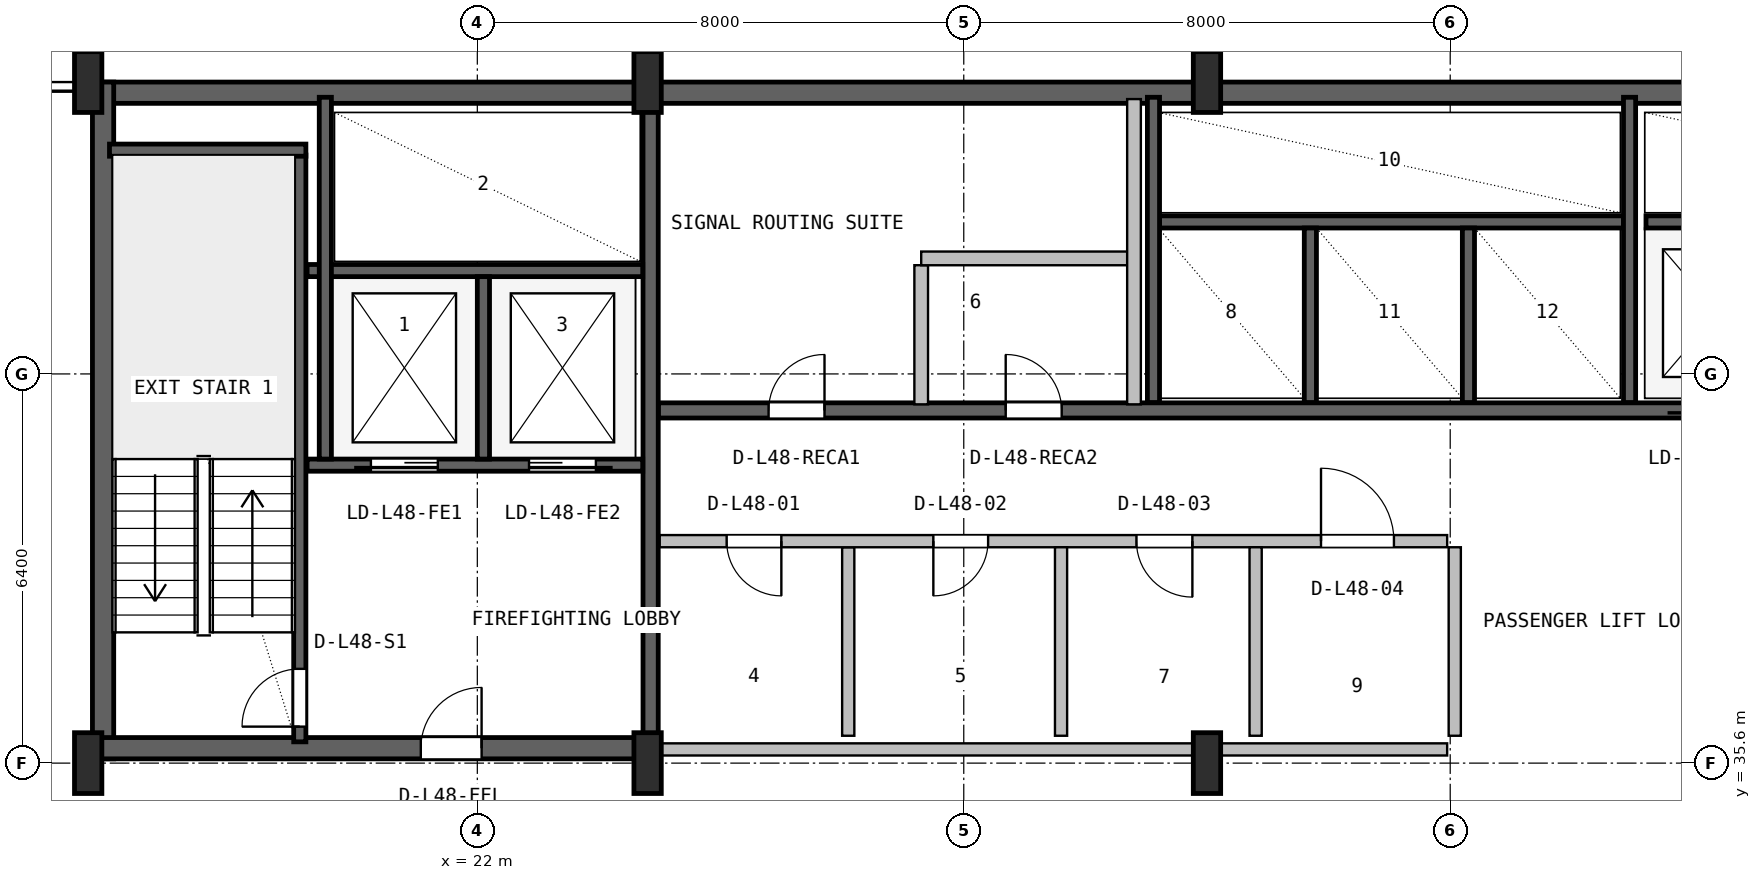
"""IFC4 building model, lengths in metres.
Left out: names, types, materials, properties, quantities, classifications, styles, units other than length and angle.
Written with IfcOpenShell. Run it as: python <this file> out.ifc"""

import sys

from ifc_helpers import new_model, si_unit, direction, frame, frame_2d, origin, origin_2d, place, context, subcontext, project, spatial, rectangle, i_section, extrude, source, transform, mapped, element, fill, save


model = new_model("IFC4")
c1 = context("Model", 3, precision=1e-05, world=origin(), true_north=direction((0.0, 1.0)))
c2 = subcontext(c1, "Body", "Model", "MODEL_VIEW")
j1 = project(units=[si_unit("LENGTHUNIT", "METRE"), si_unit("PLANEANGLEUNIT", "RADIAN")], contexts=[c1])
p1 = place(None, origin())
s1 = spatial("IfcSite", under=j1, at=p1, CompositionType="ELEMENT")
p2 = place(p1, origin())
s2 = spatial("IfcBuilding", under=s1, at=p2, CompositionType="ELEMENT")
p3 = place(p2, frame((0.0, 0.0, 196.0)))
s3 = spatial("IfcBuildingStorey", under=s2, at=p3, CompositionType="ELEMENT", Elevation=196.0)
p4 = place(p3, frame((15.6, 46.625, 0.0), z_axis=(0.0, 0.0, 1.0), x_axis=(1.0, 0.0, 0.0)))
e1 = element("IfcWall", 1, at=p4, inside=s3, PredefinedType="SHEAR", context=c2, shape_type="SweptSolid", body=[
    extrude(rectangle(XDim=36.8, YDim=0.35, at=frame_2d((18.4, 0.0))), origin(), (0.0, 0.0, 1.0), 3.55),
])
p5 = place(p3, frame((15.845, 35.67, 0.0), z_axis=(0.0, 0.0, 1.0), x_axis=(0.0, 1.0, 0.0)))
e2 = element("IfcWall", 2, at=p5, inside=s3, PredefinedType="SHEAR", context=c2, shape_type="SweptSolid", body=[
    extrude(rectangle(XDim=11.13, YDim=0.35, at=frame_2d((5.565, 0.0))), origin(), (0.0, 0.0, 1.0), 3.55),
])
p6 = place(p3, frame((15.67, 35.845, 0.0), z_axis=(0.0, 0.0, 1.0), x_axis=(1.0, 0.0, 0.0)))
e3 = element("IfcWall", 3, at=p6, inside=s3, PredefinedType="SHEAR", context=c2, shape_type="SweptSolid", body=[
    extrude(rectangle(XDim=9.13, YDim=0.35, at=frame_2d((4.565, 0.0))), origin(), (0.0, 0.0, 1.0), 3.55),
])
p7 = place(p6, frame((5.4, 0.0, 0.0)))
e4 = element("IfcOpeningElement", 4, at=p7, cuts=e3, PredefinedType="OPENING", context=c2, shape_type="SweptSolid", body=[
    extrude(rectangle(XDim=1.0, YDim=2.1, at=frame_2d((0.5, 1.05))), frame((0.0, 0.185, 0.0), z_axis=(0.0, -1.0, 0.0), x_axis=(1.0, 0.0, 0.0)), (0.0, 0.0, 1.0), 0.37),
])
m1 = source(origin(), c2, "Body", "SweptSolid", [
    extrude(i_section(OverallWidth=0.45, OverallDepth=1.0, WebThickness=0.016, FlangeThickness=0.03, FilletRadius=0.016, at=origin_2d()), origin(), (0.0, 0.0, 1.0), 3.8),
])
for number, where, z_axis, x_axis in (
    (5, (15.6, 35.6, 0.0), (0.0, 0.0, 1.0), (1.0, 0.0, 0.0)),
    (6, (15.6, 46.8, 0.0), (0.0, 0.0, 1.0), (1.0, 0.0, 0.0)),
    (7, (24.8, 35.6, 0.0), (0.0, 0.0, 1.0), (1.0, 0.0, 0.0)),
    (8, (24.8, 46.8, 0.0), (0.0, 0.0, 1.0), (1.0, 0.0, 0.0)),
    (9, (34.0, 35.6, 0.0), (0.0, 0.0, 1.0), (1.0, 0.0, 0.0)),
    (10, (34.0, 46.8, 0.0), (0.0, 0.0, 1.0), (1.0, 0.0, 0.0)),
):
    element("IfcColumn", number, at=place(p3, frame(where, z_axis=z_axis, x_axis=x_axis)), inside=s3, PredefinedType="COLUMN", context=c2, shape_type="MappedRepresentation", body=[
        mapped(m1, transform((0.0, 0.0, 0.0), x_axis=(1.0, 0.0, 0.0), y_axis=(0.0, 1.0, 0.0), z_axis=(0.0, 0.0, 1.0), scale=1.0)),
    ])
p8 = place(p3, frame((19.08, 35.95, 0.0), z_axis=(0.0, 0.0, 1.0), x_axis=(0.0, 1.0, 0.0)))
e11 = element("IfcWall", 11, at=p8, inside=s3, PredefinedType="SHEAR", context=c2, shape_type="SweptSolid", body=[
    extrude(rectangle(XDim=9.65, YDim=0.2, at=frame_2d((4.825, 0.0))), origin(), (0.0, 0.0, 1.0), 3.55),
])
p9 = place(p8, frame((0.25, 0.0, 0.0)))
e12 = element("IfcOpeningElement", 12, at=p9, cuts=e11, PredefinedType="OPENING", context=c2, shape_type="SweptSolid", body=[
    extrude(rectangle(XDim=0.95, YDim=2.1, at=frame_2d((0.475, 1.05))), frame((0.0, 0.11, 0.0), z_axis=(0.0, -1.0, 0.0), x_axis=(1.0, 0.0, 0.0)), (0.0, 0.0, 1.0), 0.22),
])
p10 = place(p3, frame((15.95, 45.68, 0.0), z_axis=(0.0, 0.0, 1.0), x_axis=(1.0, 0.0, 0.0)))
e13 = element("IfcWall", 13, at=p10, inside=s3, PredefinedType="SHEAR", context=c2, shape_type="SweptSolid", body=[
    extrude(rectangle(XDim=3.23, YDim=0.2, at=frame_2d((1.615, 0.0))), origin(), (0.0, 0.0, 1.0), 3.55),
])
p11 = place(p3, frame((24.85, 36.05, 0.0), z_axis=(0.0, 0.0, 1.0), x_axis=(0.0, 1.0, 0.0)))
e14 = element("IfcWall", 14, at=p11, inside=s3, PredefinedType="SHEAR", context=c2, shape_type="SweptSolid", body=[
    extrude(rectangle(XDim=10.45, YDim=0.25, at=frame_2d((5.225, 0.0))), origin(), (0.0, 0.0, 1.0), 3.55),
])
p12 = place(p3, frame((19.2, 40.5, 0.0), z_axis=(0.0, 0.0, 1.0), x_axis=(1.0, 0.0, 0.0)))
e15 = element("IfcWall", 15, at=p12, inside=s3, PredefinedType="SHEAR", context=c2, shape_type="SweptSolid", body=[
    extrude(rectangle(XDim=5.52, YDim=0.2, at=frame_2d((2.76, 0.0))), origin(), (0.0, 0.0, 1.0), 3.55),
])
p13 = place(p12, frame((1.05, 0.0, 0.0)))
e16 = element("IfcOpeningElement", 16, at=p13, cuts=e15, PredefinedType="OPENING", context=c2, shape_type="SweptSolid", body=[
    extrude(rectangle(XDim=1.1, YDim=2.18, at=frame_2d((0.55, 1.09))), frame((0.0, 0.11, 0.0), z_axis=(0.0, -1.0, 0.0), x_axis=(1.0, 0.0, 0.0)), (0.0, 0.0, 1.0), 0.22),
])
p14 = place(p12, frame((3.65, 0.0, 0.0)))
e17 = element("IfcOpeningElement", 17, at=p14, cuts=e15, PredefinedType="OPENING", context=c2, shape_type="SweptSolid", body=[
    extrude(rectangle(XDim=1.1, YDim=2.18, at=frame_2d((0.55, 1.09))), frame((0.0, 0.11, 0.0), z_axis=(0.0, -1.0, 0.0), x_axis=(1.0, 0.0, 0.0)), (0.0, 0.0, 1.0), 0.22),
])
p15 = place(p3, frame((19.2, 43.7, 0.0), z_axis=(0.0, 0.0, 1.0), x_axis=(1.0, 0.0, 0.0)))
e18 = element("IfcWall", 18, at=p15, inside=s3, PredefinedType="SHEAR", context=c2, shape_type="SweptSolid", body=[
    extrude(rectangle(XDim=5.52, YDim=0.2, at=frame_2d((2.76, 0.0))), origin(), (0.0, 0.0, 1.0), 3.55),
])
p16 = place(p3, frame((22.1, 40.6, 0.0), z_axis=(0.0, 0.0, 1.0), x_axis=(0.0, 1.0, 0.0)))
e19 = element("IfcWall", 19, at=p16, inside=s3, PredefinedType="SHEAR", context=c2, shape_type="SweptSolid", body=[
    extrude(rectangle(XDim=3.0, YDim=0.2, at=frame_2d((1.5, 0.0))), origin(), (0.0, 0.0, 1.0), 3.55),
])
p17 = place(p3, frame((19.5, 40.6, 0.0), z_axis=(0.0, 0.0, 1.0), x_axis=(0.0, 1.0, 0.0)))
e20 = element("IfcWall", 20, at=p17, inside=s3, PredefinedType="SHEAR", context=c2, shape_type="SweptSolid", body=[
    extrude(rectangle(XDim=5.95, YDim=0.2, at=frame_2d((2.975, 0.0))), origin(), (0.0, 0.0, 1.0), 3.55),
])
p18 = place(p3, frame((24.98, 41.4, 0.0), z_axis=(0.0, 0.0, 1.0), x_axis=(1.0, 0.0, 0.0)))
e21 = element("IfcWall", 21, at=p18, inside=s3, PredefinedType="SHEAR", context=c2, shape_type="SweptSolid", body=[
    extrude(rectangle(XDim=23.82, YDim=0.25, at=frame_2d((11.91, 0.0))), origin(), (0.0, 0.0, 1.0), 3.55),
])
p19 = place(p18, frame((16.87, 0.0, 0.0)))
e22 = element("IfcOpeningElement", 22, at=p19, cuts=e21, PredefinedType="OPENING", context=c2, shape_type="SweptSolid", body=[
    extrude(rectangle(XDim=1.1, YDim=2.18, at=frame_2d((0.55, 1.09))), frame((0.0, 0.135, 0.0), z_axis=(0.0, -1.0, 0.0), x_axis=(1.0, 0.0, 0.0)), (0.0, 0.0, 1.0), 0.27),
])
p20 = place(p18, frame((19.47, 0.0, 0.0)))
e23 = element("IfcOpeningElement", 23, at=p20, cuts=e21, PredefinedType="OPENING", context=c2, shape_type="SweptSolid", body=[
    extrude(rectangle(XDim=1.1, YDim=2.18, at=frame_2d((0.55, 1.09))), frame((0.0, 0.135, 0.0), z_axis=(0.0, -1.0, 0.0), x_axis=(1.0, 0.0, 0.0)), (0.0, 0.0, 1.0), 0.27),
])
p21 = place(p18, frame((22.07, 0.0, 0.0)))
e24 = element("IfcOpeningElement", 24, at=p21, cuts=e21, PredefinedType="OPENING", context=c2, shape_type="SweptSolid", body=[
    extrude(rectangle(XDim=1.1, YDim=2.18, at=frame_2d((0.55, 1.09))), frame((0.0, 0.135, 0.0), z_axis=(0.0, -1.0, 0.0), x_axis=(1.0, 0.0, 0.0)), (0.0, 0.0, 1.0), 0.27),
])
p22 = place(p18, frame((1.81, 0.0, 0.0)))
e25 = element("IfcOpeningElement", 25, at=p22, cuts=e21, PredefinedType="OPENING", context=c2, shape_type="SweptSolid", body=[
    extrude(rectangle(XDim=0.92, YDim=2.08, at=frame_2d((0.46, 1.04))), frame((0.0, 0.135, 0.0), z_axis=(0.0, -1.0, 0.0), x_axis=(1.0, 0.0, 0.0)), (0.0, 0.0, 1.0), 0.27),
])
p23 = place(p18, frame((5.71, 0.0, 0.0)))
e26 = element("IfcOpeningElement", 26, at=p23, cuts=e21, PredefinedType="OPENING", context=c2, shape_type="SweptSolid", body=[
    extrude(rectangle(XDim=0.92, YDim=2.08, at=frame_2d((0.46, 1.04))), frame((0.0, 0.135, 0.0), z_axis=(0.0, -1.0, 0.0), x_axis=(1.0, 0.0, 0.0)), (0.0, 0.0, 1.0), 0.27),
])
p24 = place(p3, frame((33.22, 44.5, 0.0), z_axis=(0.0, 0.0, 1.0), x_axis=(1.0, 0.0, 0.0)))
e27 = element("IfcWall", 27, at=p24, inside=s3, PredefinedType="SHEAR", context=c2, shape_type="SweptSolid", body=[
    extrude(rectangle(XDim=7.63, YDim=0.2, at=frame_2d((3.815, 0.0))), origin(), (0.0, 0.0, 1.0), 3.55),
])
p25 = place(p3, frame((33.12, 41.53, 0.0), z_axis=(0.0, 0.0, 1.0), x_axis=(0.0, 1.0, 0.0)))
e28 = element("IfcWall", 28, at=p25, inside=s3, PredefinedType="SHEAR", context=c2, shape_type="SweptSolid", body=[
    extrude(rectangle(XDim=5.02, YDim=0.2, at=frame_2d((2.51, 0.0))), origin(), (0.0, 0.0, 1.0), 3.55),
])
for number, where, z_axis, x_axis in (
    (29, (35.7, 41.53, 0.0), (0.0, 0.0, 1.0), (0.0, 1.0, 0.0)),
    (30, (38.3, 41.53, 0.0), (0.0, 0.0, 1.0), (0.0, 1.0, 0.0)),
):
    element("IfcWall", number, at=place(p3, frame(where, z_axis=z_axis, x_axis=x_axis)), inside=s3, PredefinedType="SHEAR", context=c2, shape_type="SweptSolid", body=[
        extrude(rectangle(XDim=2.87, YDim=0.2, at=frame_2d((1.435, 0.0))), origin(), (0.0, 0.0, 1.0), 3.55),
    ])
p26 = place(p3, frame((40.95, 41.53, 0.0), z_axis=(0.0, 0.0, 1.0), x_axis=(0.0, 1.0, 0.0)))
e31 = element("IfcWall", 31, at=p26, inside=s3, PredefinedType="SHEAR", context=c2, shape_type="SweptSolid", body=[
    extrude(rectangle(XDim=5.02, YDim=0.2, at=frame_2d((2.51, 0.0))), origin(), (0.0, 0.0, 1.0), 3.55),
])
p27 = place(p3, frame((41.22, 44.5, 0.0), z_axis=(0.0, 0.0, 1.0), x_axis=(1.0, 0.0, 0.0)))
e32 = element("IfcWall", 32, at=p27, inside=s3, PredefinedType="SHEAR", context=c2, shape_type="SweptSolid", body=[
    extrude(rectangle(XDim=7.58, YDim=0.2, at=frame_2d((3.79, 0.0))), origin(), (0.0, 0.0, 1.0), 3.55),
])
p28 = place(p3, frame((25.0, 35.825, 0.0), z_axis=(0.0, 0.0, 1.0), x_axis=(1.0, 0.0, 0.0)))
e33 = element("IfcWall", 33, at=p28, inside=s3, PredefinedType="SOLIDWALL", context=c2, shape_type="SweptSolid", body=[
    extrude(rectangle(XDim=12.95, YDim=0.2, at=frame_2d((6.475, 0.0))), origin(), (0.0, 0.0, 1.0), 2.575),
])
p29 = place(p3, frame((28.1, 36.05, 0.0), z_axis=(0.0, 0.0, 1.0), x_axis=(0.0, 1.0, 0.0)))
e34 = element("IfcWall", 34, at=p29, inside=s3, PredefinedType="PLUMBINGWALL", context=c2, shape_type="SweptSolid", body=[
    extrude(rectangle(XDim=3.1, YDim=0.2, at=frame_2d((1.55, 0.0))), origin(), (0.0, 0.0, 1.0), 3.53),
])
p30 = place(p3, frame((25.0, 39.25, 0.0), z_axis=(0.0, 0.0, 1.0), x_axis=(1.0, 0.0, 0.0)))
e35 = element("IfcWall", 35, at=p30, inside=s3, PredefinedType="SOLIDWALL", context=c2, shape_type="SweptSolid", body=[
    extrude(rectangle(XDim=12.95, YDim=0.2, at=frame_2d((6.475, 0.0))), origin(), (0.0, 0.0, 1.0), 3.53),
])
p31 = place(p30, frame((1.1, 0.0, 0.0)))
e36 = element("IfcOpeningElement", 36, at=p31, cuts=e35, PredefinedType="OPENING", context=c2, shape_type="SweptSolid", body=[
    extrude(rectangle(XDim=0.9, YDim=2.06, at=frame_2d((0.45, 1.03))), frame((0.0, 0.11, 0.0), z_axis=(0.0, -1.0, 0.0), x_axis=(1.0, 0.0, 0.0)), (0.0, 0.0, 1.0), 0.22),
])
p32 = place(p30, frame((4.5, 0.0, 0.0)))
e37 = element("IfcOpeningElement", 37, at=p32, cuts=e35, PredefinedType="OPENING", context=c2, shape_type="SweptSolid", body=[
    extrude(rectangle(XDim=0.9, YDim=2.06, at=frame_2d((0.45, 1.03))), frame((0.0, 0.11, 0.0), z_axis=(0.0, -1.0, 0.0), x_axis=(1.0, 0.0, 0.0)), (0.0, 0.0, 1.0), 0.22),
])
p33 = place(p30, frame((7.84, 0.0, 0.0)))
e38 = element("IfcOpeningElement", 38, at=p33, cuts=e35, PredefinedType="OPENING", context=c2, shape_type="SweptSolid", body=[
    extrude(rectangle(XDim=0.92, YDim=2.08, at=frame_2d((0.46, 1.04))), frame((0.0, 0.11, 0.0), z_axis=(0.0, -1.0, 0.0), x_axis=(1.0, 0.0, 0.0)), (0.0, 0.0, 1.0), 0.22),
])
p34 = place(p30, frame((10.875, 0.0, 0.0)))
e39 = element("IfcOpeningElement", 39, at=p34, cuts=e35, PredefinedType="OPENING", context=c2, shape_type="SweptSolid", body=[
    extrude(rectangle(XDim=1.2, YDim=2.1, at=frame_2d((0.6, 1.05))), frame((0.0, 0.11, 0.0), z_axis=(0.0, -1.0, 0.0), x_axis=(1.0, 0.0, 0.0)), (0.0, 0.0, 1.0), 0.22),
])
p35 = place(p3, frame((31.6, 36.05, 0.0), z_axis=(0.0, 0.0, 1.0), x_axis=(0.0, 1.0, 0.0)))
e40 = element("IfcWall", 40, at=p35, inside=s3, PredefinedType="PLUMBINGWALL", context=c2, shape_type="SweptSolid", body=[
    extrude(rectangle(XDim=3.1, YDim=0.2, at=frame_2d((1.55, 0.0))), origin(), (0.0, 0.0, 1.0), 3.53),
])
for number, where, z_axis, x_axis in (
    (41, (34.8, 36.05, 0.0), (0.0, 0.0, 1.0), (0.0, 1.0, 0.0)),
    (42, (38.075, 36.05, 0.0), (0.0, 0.0, 1.0), (0.0, 1.0, 0.0)),
):
    element("IfcWall", number, at=place(p3, frame(where, z_axis=z_axis, x_axis=x_axis)), inside=s3, PredefinedType="SOLIDWALL", context=c2, shape_type="SweptSolid", body=[
        extrude(rectangle(XDim=3.1, YDim=0.2, at=frame_2d((1.55, 0.0))), origin(), (0.0, 0.0, 1.0), 3.53),
    ])
p36 = place(p3, frame((29.3, 41.5, 0.0), z_axis=(0.0, 0.0, 1.0), x_axis=(0.0, 1.0, 0.0)))
e43 = element("IfcWall", 43, at=p36, inside=s3, PredefinedType="PARTITIONING", context=c2, shape_type="SweptSolid", body=[
    extrude(rectangle(XDim=2.288, YDim=0.225, at=frame_2d((1.144, 0.0))), origin(), (0.0, 0.0, 1.0), 3.53),
])
p37 = place(p3, frame((29.3, 43.9, 0.0), z_axis=(0.0, 0.0, 1.0), x_axis=(1.0, 0.0, 0.0)))
e44 = element("IfcWall", 44, at=p37, inside=s3, PredefinedType="PARTITIONING", context=c2, shape_type="SweptSolid", body=[
    extrude(rectangle(XDim=3.5, YDim=0.225, at=frame_2d((1.75, 0.0))), origin(), (0.0, 0.0, 1.0), 3.53),
])
p38 = place(p3, frame((32.8, 41.5, 0.0), z_axis=(0.0, 0.0, 1.0), x_axis=(0.0, 1.0, 0.0)))
e45 = element("IfcWall", 45, at=p38, inside=s3, PredefinedType="PARTITIONING", context=c2, shape_type="SweptSolid", body=[
    extrude(rectangle(XDim=5.02, YDim=0.225, at=frame_2d((2.51, 0.0))), origin(), (0.0, 0.0, 1.0), 3.53),
])
m2 = source(origin(), c2, "Body", "SweptSolid", [
    extrude(rectangle(XDim=0.95, YDim=2.1, at=frame_2d((0.475, 1.05))), frame((0.0, 0.025, 0.0), z_axis=(0.0, -1.0, 0.0), x_axis=(1.0, 0.0, 0.0)), (0.0, 0.0, 1.0), 0.05),
])
p39 = place(p9, origin())
e46 = element("IfcDoor", 46, at=p39, inside=s3, OperationType="SINGLE_SWING_LEFT", PredefinedType="DOOR", context=c2, shape_type="MappedRepresentation", body=[
    mapped(m2, transform((0.0, 0.0, 0.0), x_axis=(1.0, 0.0, 0.0), y_axis=(0.0, 1.0, 0.0), z_axis=(0.0, 0.0, 1.0), scale=1.0)),
])
fill(e12, e46)
m3 = source(origin(), c2, "Body", "SweptSolid", [
    extrude(rectangle(XDim=1.0, YDim=2.1, at=frame_2d((0.5, 1.05))), frame((0.0, 0.025, 0.0), z_axis=(0.0, -1.0, 0.0), x_axis=(1.0, 0.0, 0.0)), (0.0, 0.0, 1.0), 0.05),
])
p40 = place(p7, origin())
e47 = element("IfcDoor", 47, at=p40, inside=s3, OperationType="SINGLE_SWING_RIGHT", PredefinedType="DOOR", context=c2, shape_type="MappedRepresentation", body=[
    mapped(m3, transform((0.0, 0.0, 0.0), x_axis=(1.0, 0.0, 0.0), y_axis=(0.0, 1.0, 0.0), z_axis=(0.0, 0.0, 1.0), scale=1.0)),
])
fill(e4, e47)
m4 = source(origin(), c2, "Body", "SweptSolid", [
    extrude(rectangle(XDim=1.1, YDim=2.18, at=frame_2d((0.55, 1.09))), frame((0.0, 0.025, 0.0), z_axis=(0.0, -1.0, 0.0), x_axis=(1.0, 0.0, 0.0)), (0.0, 0.0, 1.0), 0.05),
])
p41 = place(p13, frame((1.1, 0.0, 0.0), z_axis=(0.0, 0.0, 1.0), x_axis=(-1.0, 0.0, 0.0)))
e48 = element("IfcDoor", 48, at=p41, inside=s3, OperationType="SLIDING_TO_LEFT", PredefinedType="DOOR", context=c2, shape_type="MappedRepresentation", body=[
    mapped(m4, transform((0.0, 0.0, 0.0), x_axis=(1.0, 0.0, 0.0), y_axis=(0.0, 1.0, 0.0), z_axis=(0.0, 0.0, 1.0), scale=1.0)),
])
fill(e16, e48)
p42 = place(p14, frame((1.1, 0.0, 0.0), z_axis=(0.0, 0.0, 1.0), x_axis=(-1.0, 0.0, 0.0)))
e49 = element("IfcDoor", 49, at=p42, inside=s3, OperationType="SLIDING_TO_RIGHT", PredefinedType="DOOR", context=c2, shape_type="MappedRepresentation", body=[
    mapped(m4, transform((0.0, 0.0, 0.0), x_axis=(1.0, 0.0, 0.0), y_axis=(0.0, 1.0, 0.0), z_axis=(0.0, 0.0, 1.0), scale=1.0)),
])
fill(e17, e49)
m5 = source(origin(), c2, "Body", "SweptSolid", [
    extrude(rectangle(XDim=0.92, YDim=2.08, at=frame_2d((0.46, 1.04))), frame((0.0, 0.025, 0.0), z_axis=(0.0, -1.0, 0.0), x_axis=(1.0, 0.0, 0.0)), (0.0, 0.0, 1.0), 0.05),
])
p43 = place(p22, origin())
e50 = element("IfcDoor", 50, at=p43, inside=s3, OperationType="SINGLE_SWING_RIGHT", PredefinedType="DOOR", context=c2, shape_type="MappedRepresentation", body=[
    mapped(m5, transform((0.0, 0.0, 0.0), x_axis=(1.0, 0.0, 0.0), y_axis=(0.0, 1.0, 0.0), z_axis=(0.0, 0.0, 1.0), scale=1.0)),
])
fill(e25, e50)
p44 = place(p23, origin())
e51 = element("IfcDoor", 51, at=p44, inside=s3, OperationType="SINGLE_SWING_LEFT", PredefinedType="DOOR", context=c2, shape_type="MappedRepresentation", body=[
    mapped(m5, transform((0.0, 0.0, 0.0), x_axis=(1.0, 0.0, 0.0), y_axis=(0.0, 1.0, 0.0), z_axis=(0.0, 0.0, 1.0), scale=1.0)),
])
fill(e26, e51)
m6 = source(origin(), c2, "Body", "SweptSolid", [
    extrude(rectangle(XDim=0.9, YDim=2.06, at=frame_2d((0.45, 1.03))), frame((0.0, 0.025, 0.0), z_axis=(0.0, -1.0, 0.0), x_axis=(1.0, 0.0, 0.0)), (0.0, 0.0, 1.0), 0.05),
])
p45 = place(p31, frame((0.9, 0.0, 0.0), z_axis=(0.0, 0.0, 1.0), x_axis=(-1.0, 0.0, 0.0)))
e52 = element("IfcDoor", 52, at=p45, inside=s3, OperationType="SINGLE_SWING_RIGHT", PredefinedType="DOOR", context=c2, shape_type="MappedRepresentation", body=[
    mapped(m6, transform((0.0, 0.0, 0.0), x_axis=(1.0, 0.0, 0.0), y_axis=(0.0, 1.0, 0.0), z_axis=(0.0, 0.0, 1.0), scale=1.0)),
])
fill(e36, e52)
p46 = place(p32, frame((0.9, 0.0, 0.0), z_axis=(0.0, 0.0, 1.0), x_axis=(-1.0, 0.0, 0.0)))
e53 = element("IfcDoor", 53, at=p46, inside=s3, OperationType="SINGLE_SWING_LEFT", PredefinedType="DOOR", context=c2, shape_type="MappedRepresentation", body=[
    mapped(m6, transform((0.0, 0.0, 0.0), x_axis=(1.0, 0.0, 0.0), y_axis=(0.0, 1.0, 0.0), z_axis=(0.0, 0.0, 1.0), scale=1.0)),
])
fill(e37, e53)
p47 = place(p33, frame((0.92, 0.0, 0.0), z_axis=(0.0, 0.0, 1.0), x_axis=(-1.0, 0.0, 0.0)))
e54 = element("IfcDoor", 54, at=p47, inside=s3, OperationType="SINGLE_SWING_RIGHT", PredefinedType="DOOR", context=c2, shape_type="MappedRepresentation", body=[
    mapped(m5, transform((0.0, 0.0, 0.0), x_axis=(1.0, 0.0, 0.0), y_axis=(0.0, 1.0, 0.0), z_axis=(0.0, 0.0, 1.0), scale=1.0)),
])
fill(e38, e54)
m7 = source(origin(), c2, "Body", "SweptSolid", [
    extrude(rectangle(XDim=1.2, YDim=2.1, at=frame_2d((0.6, 1.05))), frame((0.0, 0.025, 0.0), z_axis=(0.0, -1.0, 0.0), x_axis=(1.0, 0.0, 0.0)), (0.0, 0.0, 1.0), 0.05),
])
p48 = place(p34, origin())
e55 = element("IfcDoor", 55, at=p48, inside=s3, OperationType="SINGLE_SWING_LEFT", PredefinedType="DOOR", context=c2, shape_type="MappedRepresentation", body=[
    mapped(m7, transform((0.0, 0.0, 0.0), x_axis=(1.0, 0.0, 0.0), y_axis=(0.0, 1.0, 0.0), z_axis=(0.0, 0.0, 1.0), scale=1.0)),
])
fill(e39, e55)
save(model, sys.argv[1])
